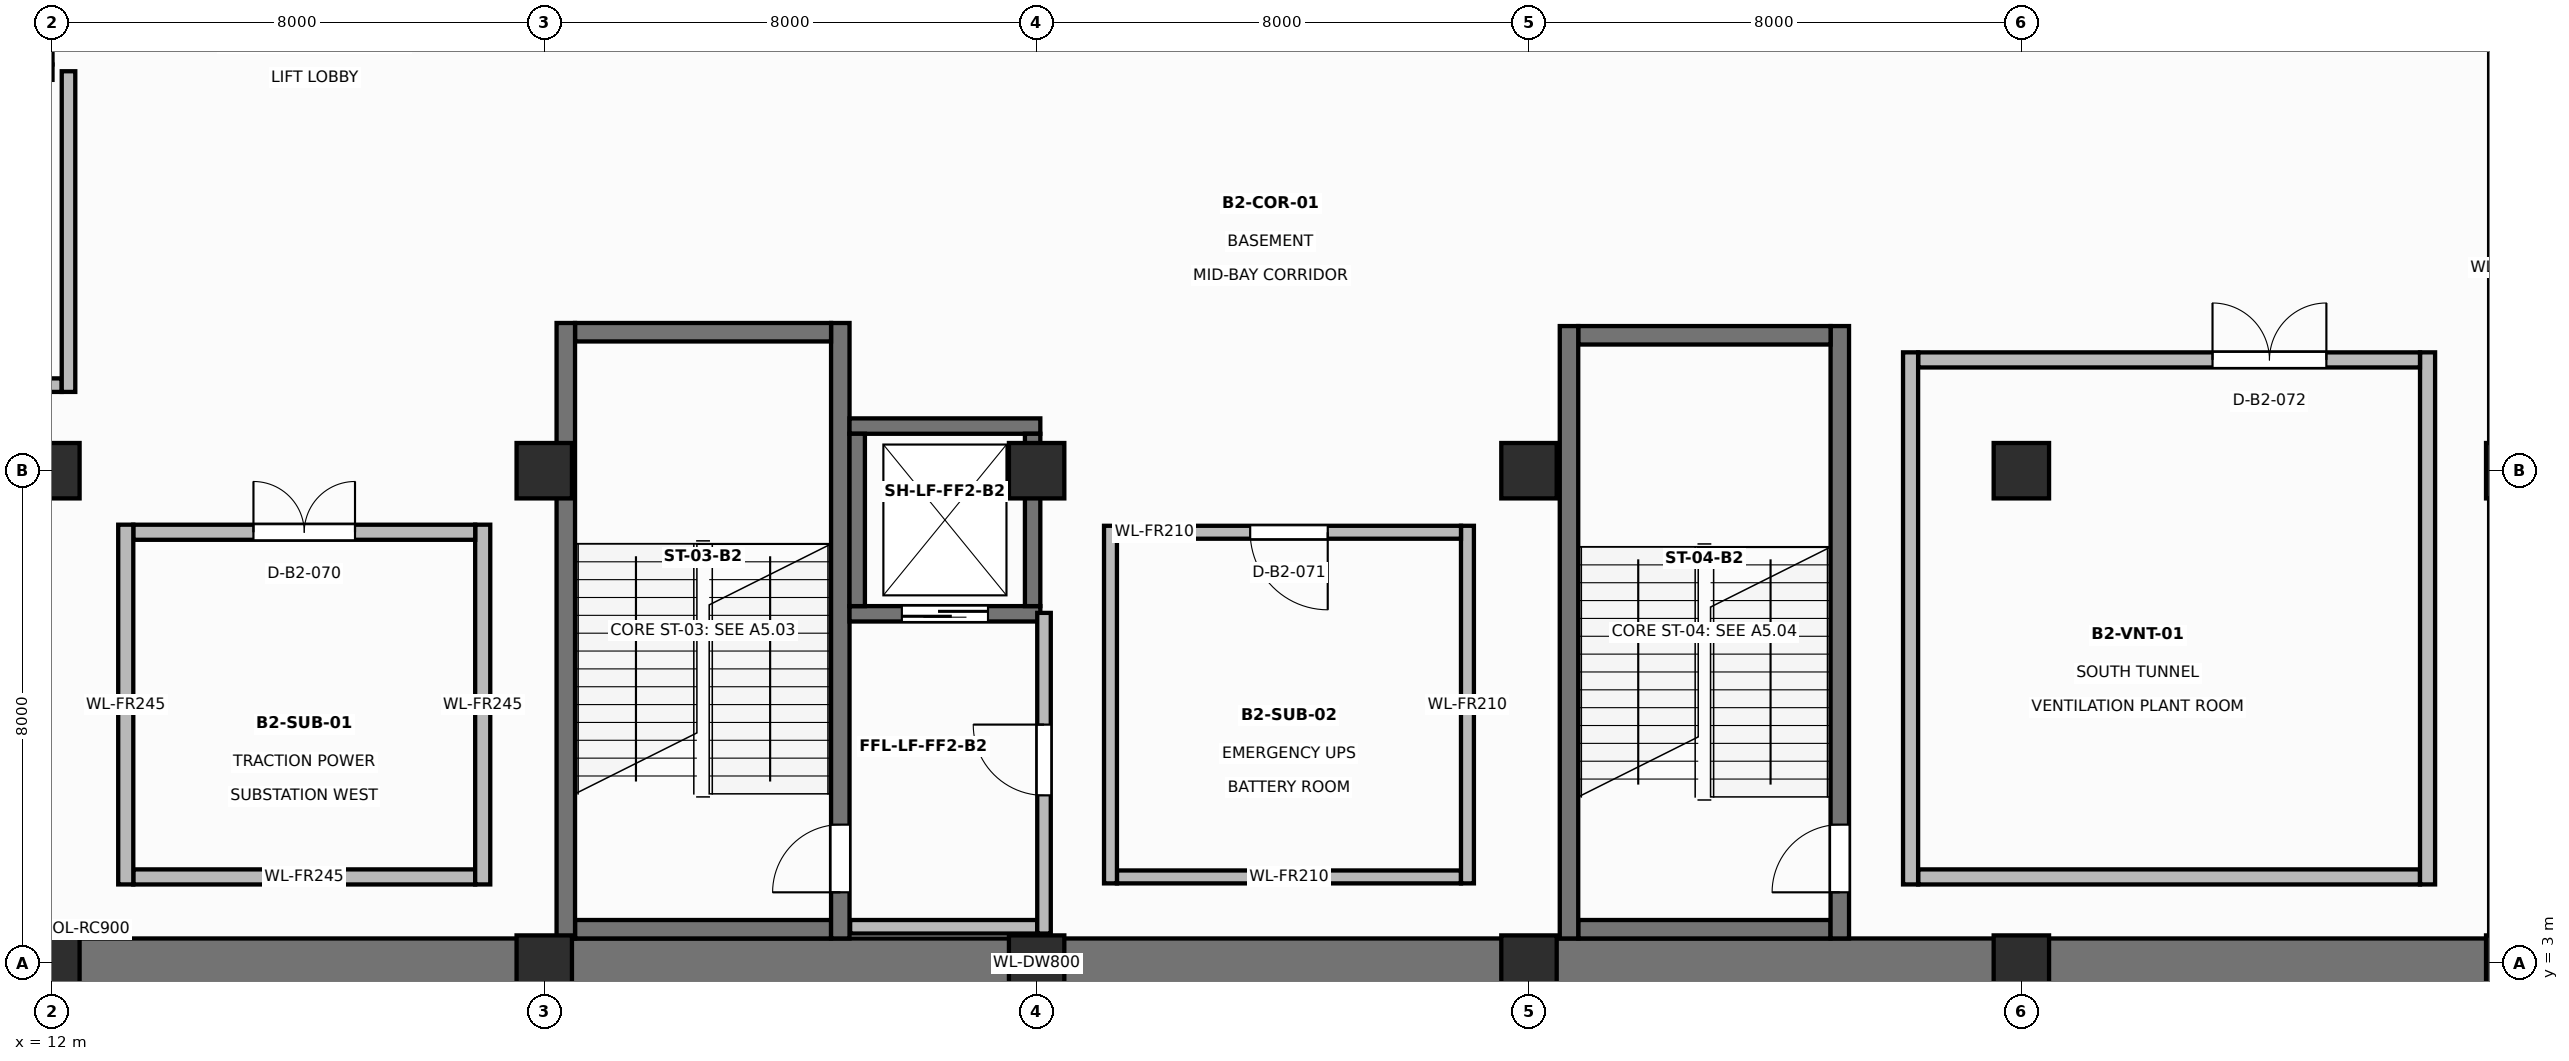
"""IFC4 building model, lengths in metres.
Left out: names, types, materials, properties, quantities, classifications, styles, units other than length and angle.
Written with IfcOpenShell. Run it as: python <this file> out.ifc"""

import sys

from ifc_helpers import new_model, si_unit, direction, frame, frame_2d, origin, origin_2d, place, context, subcontext, project, spatial, rectangle, extrude, element, fill, save


model = new_model("IFC4")
c1 = context("Model", 3, precision=1e-05, world=origin(), true_north=direction((0.0, 1.0)))
c2 = subcontext(c1, "Body", "Model", "MODEL_VIEW")
j1 = project(units=[si_unit("LENGTHUNIT", "METRE"), si_unit("PLANEANGLEUNIT", "RADIAN")], contexts=[c1])
p1 = place(None, origin())
s1 = spatial("IfcSite", under=j1, at=p1, CompositionType="ELEMENT")
p2 = place(p1, origin())
s2 = spatial("IfcBuilding", under=s1, at=p2, CompositionType="ELEMENT")
p3 = place(p2, frame((0.0, 0.0, -11.2)))
s3 = spatial("IfcBuildingStorey", under=s2, at=p3, CompositionType="ELEMENT", Elevation=-11.2)
p4 = place(p3, frame((4.4, 3.0, 0.0), z_axis=(0.0, 0.0, 1.0), x_axis=(1.0, 0.0, 0.0)))
e1 = element("IfcWall", 1, at=p4, inside=s3, PredefinedType="SOLIDWALL", context=c2, shape_type="SweptSolid", body=[
    extrude(rectangle(XDim=47.2, YDim=0.8, at=frame_2d((23.6, 0.0))), origin(), (0.0, 0.0, 1.0), 5.22),
])
p5 = place(p3, frame((52.0, 2.6, 0.0), z_axis=(0.0, 0.0, 1.0), x_axis=(0.0, 1.0, 0.0)))
e2 = element("IfcWall", 2, at=p5, inside=s3, PredefinedType="SOLIDWALL", context=c2, shape_type="SweptSolid", body=[
    extrude(rectangle(XDim=23.4, YDim=0.8, at=frame_2d((11.7, 0.0))), origin(), (0.0, 0.0, 1.0), 5.22),
])
for number, where, z_axis, x_axis in (
    (3, (12.0, 3.0, 0.0), (0.0, 0.0, 1.0), (1.0, 0.0, 0.0)),
    (4, (12.0, 11.0, 0.0), (0.0, 0.0, 1.0), (1.0, 0.0, 0.0)),
    (5, (20.0, 3.0, 0.0), (0.0, 0.0, 1.0), (1.0, 0.0, 0.0)),
    (6, (20.0, 11.0, 0.0), (0.0, 0.0, 1.0), (1.0, 0.0, 0.0)),
    (7, (28.0, 3.0, 0.0), (0.0, 0.0, 1.0), (1.0, 0.0, 0.0)),
    (8, (28.0, 11.0, 0.0), (0.0, 0.0, 1.0), (1.0, 0.0, 0.0)),
    (9, (36.0, 3.0, 0.0), (0.0, 0.0, 1.0), (1.0, 0.0, 0.0)),
    (10, (36.0, 11.0, 0.0), (0.0, 0.0, 1.0), (1.0, 0.0, 0.0)),
    (11, (44.0, 3.0, 0.0), (0.0, 0.0, 1.0), (1.0, 0.0, 0.0)),
    (12, (44.0, 11.0, 0.0), (0.0, 0.0, 1.0), (1.0, 0.0, 0.0)),
    (13, (52.0, 3.0, 0.0), (0.0, 0.0, 1.0), (1.0, 0.0, 0.0)),
    (14, (52.0, 11.0, 0.0), (0.0, 0.0, 1.0), (1.0, 0.0, 0.0)),
):
    element("IfcColumn", number, at=place(p3, frame(where, z_axis=z_axis, x_axis=x_axis)), inside=s3, PredefinedType="COLUMN", context=c2, shape_type="SweptSolid", body=[
        extrude(rectangle(XDim=0.9, YDim=0.9, at=origin_2d()), origin(), (0.0, 0.0, 1.0), 5.6),
    ])
p6 = place(p3, frame((20.5, 3.55, 0.0), z_axis=(0.0, 0.0, 1.0), x_axis=(1.0, 0.0, 0.0)))
e15 = element("IfcWall", 15, at=p6, inside=s3, PredefinedType="SHEAR", context=c2, shape_type="SweptSolid", body=[
    extrude(rectangle(XDim=4.16, YDim=0.3, at=frame_2d((2.08, 0.0))), origin(), (0.0, 0.0, 1.0), 5.235),
])
p7 = place(p3, frame((24.81, 3.4, 0.0), z_axis=(0.0, 0.0, 1.0), x_axis=(0.0, 1.0, 0.0)))
e16 = element("IfcWall", 16, at=p7, inside=s3, PredefinedType="SHEAR", context=c2, shape_type="SweptSolid", body=[
    extrude(rectangle(XDim=10.0, YDim=0.3, at=frame_2d((5.0, 0.0))), origin(), (0.0, 0.0, 1.0), 5.235),
])
p8 = place(p7, frame((0.75, 0.0, 0.0)))
e17 = element("IfcOpeningElement", 17, at=p8, cuts=e16, PredefinedType="OPENING", context=c2, shape_type="SweptSolid", body=[
    extrude(rectangle(XDim=1.1, YDim=2.15, at=frame_2d((0.55, 1.075))), frame((0.0, 0.16, 0.0), z_axis=(0.0, -1.0, 0.0), x_axis=(1.0, 0.0, 0.0)), (0.0, 0.0, 1.0), 0.32),
])
p9 = place(p3, frame((24.66, 13.25, 0.0), z_axis=(0.0, 0.0, 1.0), x_axis=(-1.0, 0.0, 0.0)))
e18 = element("IfcWall", 18, at=p9, inside=s3, PredefinedType="SHEAR", context=c2, shape_type="SweptSolid", body=[
    extrude(rectangle(XDim=4.16, YDim=0.3, at=frame_2d((2.08, 0.0))), origin(), (0.0, 0.0, 1.0), 5.235),
])
p10 = place(p3, frame((20.35, 13.4, 0.0), z_axis=(0.0, 0.0, 1.0), x_axis=(0.0, -1.0, 0.0)))
e19 = element("IfcWall", 19, at=p10, inside=s3, PredefinedType="SHEAR", context=c2, shape_type="SweptSolid", body=[
    extrude(rectangle(XDim=10.0, YDim=0.3, at=frame_2d((5.0, 0.0))), origin(), (0.0, 0.0, 1.0), 5.235),
])
p11 = place(p3, frame((36.8, 3.55, 0.0), z_axis=(0.0, 0.0, 1.0), x_axis=(1.0, 0.0, 0.0)))
e20 = element("IfcWall", 20, at=p11, inside=s3, PredefinedType="SHEAR", context=c2, shape_type="SweptSolid", body=[
    extrude(rectangle(XDim=4.1, YDim=0.3, at=frame_2d((2.05, 0.0))), origin(), (0.0, 0.0, 1.0), 5.235),
])
p12 = place(p3, frame((41.05, 3.4, 0.0), z_axis=(0.0, 0.0, 1.0), x_axis=(0.0, 1.0, 0.0)))
e21 = element("IfcWall", 21, at=p12, inside=s3, PredefinedType="SHEAR", context=c2, shape_type="SweptSolid", body=[
    extrude(rectangle(XDim=9.95, YDim=0.3, at=frame_2d((4.975, 0.0))), origin(), (0.0, 0.0, 1.0), 5.235),
])
p13 = place(p12, frame((0.75, 0.0, 0.0)))
e22 = element("IfcOpeningElement", 22, at=p13, cuts=e21, PredefinedType="OPENING", context=c2, shape_type="SweptSolid", body=[
    extrude(rectangle(XDim=1.1, YDim=2.15, at=frame_2d((0.55, 1.075))), frame((0.0, 0.16, 0.0), z_axis=(0.0, -1.0, 0.0), x_axis=(1.0, 0.0, 0.0)), (0.0, 0.0, 1.0), 0.32),
])
p14 = place(p3, frame((40.9, 13.2, 0.0), z_axis=(0.0, 0.0, 1.0), x_axis=(-1.0, 0.0, 0.0)))
e23 = element("IfcWall", 23, at=p14, inside=s3, PredefinedType="SHEAR", context=c2, shape_type="SweptSolid", body=[
    extrude(rectangle(XDim=4.1, YDim=0.3, at=frame_2d((2.05, 0.0))), origin(), (0.0, 0.0, 1.0), 5.235),
])
p15 = place(p3, frame((36.65, 13.35, 0.0), z_axis=(0.0, 0.0, 1.0), x_axis=(0.0, -1.0, 0.0)))
e24 = element("IfcWall", 24, at=p15, inside=s3, PredefinedType="SHEAR", context=c2, shape_type="SweptSolid", body=[
    extrude(rectangle(XDim=9.95, YDim=0.3, at=frame_2d((4.975, 0.0))), origin(), (0.0, 0.0, 1.0), 5.235),
])
p16 = place(p3, frame((9.11, 17.475, 0.0), z_axis=(0.0, 0.0, 1.0), x_axis=(1.0, 0.0, 0.0)))
e25 = element("IfcWall", 25, at=p16, inside=s3, PredefinedType="SOLIDWALL", context=c2, shape_type="SweptSolid", body=[
    extrude(rectangle(XDim=2.9, YDim=0.25, at=frame_2d((1.45, 0.0))), origin(), (0.0, 0.0, 1.0), 5.235),
])
p17 = place(p16, frame((0.75, 0.0, 0.0)))
e26 = element("IfcOpeningElement", 26, at=p17, cuts=e25, PredefinedType="OPENING", context=c2, shape_type="SweptSolid", body=[
    extrude(rectangle(XDim=1.4, YDim=2.25, at=frame_2d((0.7, 1.125))), frame((0.0, 0.135, 0.0), z_axis=(0.0, -1.0, 0.0), x_axis=(1.0, 0.0, 0.0)), (0.0, 0.0, 1.0), 0.27),
])
p18 = place(p3, frame((11.885, 17.6, 0.0), z_axis=(0.0, 0.0, 1.0), x_axis=(0.0, 1.0, 0.0)))
e27 = element("IfcWall", 27, at=p18, inside=s3, PredefinedType="SOLIDWALL", context=c2, shape_type="SweptSolid", body=[
    extrude(rectangle(XDim=2.8, YDim=0.25, at=frame_2d((1.4, 0.0))), origin(), (0.0, 0.0, 1.0), 5.235),
])
p19 = place(p3, frame((9.12, 12.39, 0.0), z_axis=(0.0, 0.0, 1.0), x_axis=(1.0, 0.0, 0.0)))
e28 = element("IfcWall", 28, at=p19, inside=s3, PredefinedType="SOLIDWALL", context=c2, shape_type="SweptSolid", body=[
    extrude(rectangle(XDim=3.04, YDim=0.22, at=frame_2d((1.52, 0.0))), origin(), (0.0, 0.0, 1.0), 4.435),
])
p20 = place(p19, frame((0.805, 0.0, 0.0)))
e29 = element("IfcOpeningElement", 29, at=p20, cuts=e28, PredefinedType="OPENING", context=c2, shape_type="SweptSolid", body=[
    extrude(rectangle(XDim=1.15, YDim=2.15, at=frame_2d((0.575, 1.075))), frame((0.0, 0.12, 0.0), z_axis=(0.0, -1.0, 0.0), x_axis=(1.0, 0.0, 0.0)), (0.0, 0.0, 1.0), 0.24),
])
p21 = place(p3, frame((12.27, 12.28, 0.0), z_axis=(0.0, 0.0, 1.0), x_axis=(0.0, 1.0, 0.0)))
e30 = element("IfcWall", 30, at=p21, inside=s3, PredefinedType="SOLIDWALL", context=c2, shape_type="SweptSolid", body=[
    extrude(rectangle(XDim=5.21, YDim=0.22, at=frame_2d((2.605, 0.0))), origin(), (0.0, 0.0, 1.0), 4.435),
])
p22 = place(p3, frame((24.96, 8.675, 0.0), z_axis=(0.0, 0.0, 1.0), x_axis=(1.0, 0.0, 0.0)))
e31 = element("IfcWall", 31, at=p22, inside=s3, PredefinedType="SOLIDWALL", context=c2, shape_type="SweptSolid", body=[
    extrude(rectangle(XDim=3.1, YDim=0.25, at=frame_2d((1.55, 0.0))), origin(), (0.0, 0.0, 1.0), 5.235),
])
p23 = place(p22, frame((0.85, 0.0, 0.0)))
e32 = element("IfcOpeningElement", 32, at=p23, cuts=e31, PredefinedType="OPENING", context=c2, shape_type="SweptSolid", body=[
    extrude(rectangle(XDim=1.4, YDim=2.25, at=frame_2d((0.7, 1.125))), frame((0.0, 0.135, 0.0), z_axis=(0.0, -1.0, 0.0), x_axis=(1.0, 0.0, 0.0)), (0.0, 0.0, 1.0), 0.27),
])
p24 = place(p3, frame((28.06, 11.725, 0.0), z_axis=(0.0, 0.0, 1.0), x_axis=(-1.0, 0.0, 0.0)))
e33 = element("IfcWall", 33, at=p24, inside=s3, PredefinedType="SOLIDWALL", context=c2, shape_type="SweptSolid", body=[
    extrude(rectangle(XDim=3.1, YDim=0.25, at=frame_2d((1.55, 0.0))), origin(), (0.0, 0.0, 1.0), 5.235),
])
for number, where, z_axis, x_axis in (
    (34, (27.935, 8.8, 0.0), (0.0, 0.0, 1.0), (0.0, 1.0, 0.0)),
    (35, (25.085, 11.6, 0.0), (0.0, 0.0, 1.0), (0.0, -1.0, 0.0)),
):
    element("IfcWall", number, at=place(p3, frame(where, z_axis=z_axis, x_axis=x_axis)), inside=s3, PredefinedType="SOLIDWALL", context=c2, shape_type="SweptSolid", body=[
        extrude(rectangle(XDim=2.8, YDim=0.25, at=frame_2d((1.4, 0.0))), origin(), (0.0, 0.0, 1.0), 5.235),
    ])
p25 = place(p3, frame((24.97, 3.59, 0.0), z_axis=(0.0, 0.0, 1.0), x_axis=(1.0, 0.0, 0.0)))
e36 = element("IfcWall", 36, at=p25, inside=s3, PredefinedType="SOLIDWALL", context=c2, shape_type="SweptSolid", body=[
    extrude(rectangle(XDim=3.04, YDim=0.22, at=frame_2d((1.52, 0.0))), origin(), (0.0, 0.0, 1.0), 4.435),
])
p26 = place(p3, frame((28.12, 3.48, 0.0), z_axis=(0.0, 0.0, 1.0), x_axis=(0.0, 1.0, 0.0)))
e37 = element("IfcWall", 37, at=p26, inside=s3, PredefinedType="SOLIDWALL", context=c2, shape_type="SweptSolid", body=[
    extrude(rectangle(XDim=5.21, YDim=0.22, at=frame_2d((2.605, 0.0))), origin(), (0.0, 0.0, 1.0), 4.435),
])
p27 = place(p26, frame((2.245, 0.0, 0.0)))
e38 = element("IfcOpeningElement", 38, at=p27, cuts=e37, PredefinedType="OPENING", context=c2, shape_type="SweptSolid", body=[
    extrude(rectangle(XDim=1.15, YDim=2.15, at=frame_2d((0.575, 1.075))), frame((0.0, 0.12, 0.0), z_axis=(0.0, -1.0, 0.0), x_axis=(1.0, 0.0, 0.0)), (0.0, 0.0, 1.0), 0.24),
])
p28 = place(p3, frame((13.322, 4.4, 0.0), z_axis=(0.0, 0.0, 1.0), x_axis=(1.0, 0.0, 0.0)))
e39 = element("IfcWall", 39, at=p28, inside=s3, PredefinedType="SOLIDWALL", context=c2, shape_type="SweptSolid", body=[
    extrude(rectangle(XDim=5.556, YDim=0.245, at=frame_2d((2.778, 0.0))), origin(), (0.0, 0.0, 1.0), 5.22),
])
p29 = place(p3, frame((19.0, 4.278, 0.0), z_axis=(0.0, 0.0, 1.0), x_axis=(0.0, 1.0, 0.0)))
e40 = element("IfcWall", 40, at=p29, inside=s3, PredefinedType="SOLIDWALL", context=c2, shape_type="SweptSolid", body=[
    extrude(rectangle(XDim=5.845, YDim=0.245, at=frame_2d((2.922, 0.0))), origin(), (0.0, 0.0, 1.0), 4.585),
])
p30 = place(p3, frame((18.878, 10.0, 0.0), z_axis=(0.0, 0.0, 1.0), x_axis=(-1.0, 0.0, 0.0)))
e41 = element("IfcWall", 41, at=p30, inside=s3, PredefinedType="SOLIDWALL", context=c2, shape_type="SweptSolid", body=[
    extrude(rectangle(XDim=5.556, YDim=0.245, at=frame_2d((2.778, 0.0))), origin(), (0.0, 0.0, 1.0), 5.22),
])
p31 = place(p30, frame((1.953, 0.0, 0.0)))
e42 = element("IfcOpeningElement", 42, at=p31, cuts=e41, PredefinedType="OPENING", context=c2, shape_type="SweptSolid", body=[
    extrude(rectangle(XDim=1.65, YDim=2.2, at=frame_2d((0.825, 1.1))), frame((0.0, 0.133, 0.0), z_axis=(0.0, -1.0, 0.0), x_axis=(1.0, 0.0, 0.0)), (0.0, 0.0, 1.0), 0.265),
])
p32 = place(p3, frame((13.2, 10.123, 0.0), z_axis=(0.0, 0.0, 1.0), x_axis=(0.0, -1.0, 0.0)))
e43 = element("IfcWall", 43, at=p32, inside=s3, PredefinedType="SOLIDWALL", context=c2, shape_type="SweptSolid", body=[
    extrude(rectangle(XDim=5.845, YDim=0.245, at=frame_2d((2.922, 0.0))), origin(), (0.0, 0.0, 1.0), 4.585),
])
p33 = place(p3, frame((29.305, 4.4, 0.0), z_axis=(0.0, 0.0, 1.0), x_axis=(1.0, 0.0, 0.0)))
e44 = element("IfcWall", 44, at=p33, inside=s3, PredefinedType="SOLIDWALL", context=c2, shape_type="SweptSolid", body=[
    extrude(rectangle(XDim=5.59, YDim=0.21, at=frame_2d((2.795, 0.0))), origin(), (0.0, 0.0, 1.0), 5.22),
])
p34 = place(p3, frame((35.0, 4.295, 0.0), z_axis=(0.0, 0.0, 1.0), x_axis=(0.0, 1.0, 0.0)))
e45 = element("IfcWall", 45, at=p34, inside=s3, PredefinedType="SOLIDWALL", context=c2, shape_type="SweptSolid", body=[
    extrude(rectangle(XDim=5.81, YDim=0.21, at=frame_2d((2.905, 0.0))), origin(), (0.0, 0.0, 1.0), 4.585),
])
p35 = place(p3, frame((34.895, 10.0, 0.0), z_axis=(0.0, 0.0, 1.0), x_axis=(-1.0, 0.0, 0.0)))
e46 = element("IfcWall", 46, at=p35, inside=s3, PredefinedType="SOLIDWALL", context=c2, shape_type="SweptSolid", body=[
    extrude(rectangle(XDim=5.59, YDim=0.21, at=frame_2d((2.795, 0.0))), origin(), (0.0, 0.0, 1.0), 5.22),
])
p36 = place(p35, frame((2.165, 0.0, 0.0)))
e47 = element("IfcOpeningElement", 47, at=p36, cuts=e46, PredefinedType="OPENING", context=c2, shape_type="SweptSolid", body=[
    extrude(rectangle(XDim=1.26, YDim=2.2, at=frame_2d((0.63, 1.1))), frame((0.0, 0.115, 0.0), z_axis=(0.0, -1.0, 0.0), x_axis=(1.0, 0.0, 0.0)), (0.0, 0.0, 1.0), 0.23),
])
p37 = place(p3, frame((29.2, 10.105, 0.0), z_axis=(0.0, 0.0, 1.0), x_axis=(0.0, -1.0, 0.0)))
e48 = element("IfcWall", 48, at=p37, inside=s3, PredefinedType="SOLIDWALL", context=c2, shape_type="SweptSolid", body=[
    extrude(rectangle(XDim=5.81, YDim=0.21, at=frame_2d((2.905, 0.0))), origin(), (0.0, 0.0, 1.0), 4.585),
])
p38 = place(p3, frame((42.323, 4.4, 0.0), z_axis=(0.0, 0.0, 1.0), x_axis=(1.0, 0.0, 0.0)))
e49 = element("IfcWall", 49, at=p38, inside=s3, PredefinedType="SOLIDWALL", context=c2, shape_type="SweptSolid", body=[
    extrude(rectangle(XDim=8.154, YDim=0.245, at=frame_2d((4.077, 0.0))), origin(), (0.0, 0.0, 1.0), 4.435),
])
p39 = place(p3, frame((50.6, 4.278, 0.0), z_axis=(0.0, 0.0, 1.0), x_axis=(0.0, 1.0, 0.0)))
e50 = element("IfcWall", 50, at=p39, inside=s3, PredefinedType="SOLIDWALL", context=c2, shape_type="SweptSolid", body=[
    extrude(rectangle(XDim=8.645, YDim=0.245, at=frame_2d((4.323, 0.0))), origin(), (0.0, 0.0, 1.0), 4.435),
])
p40 = place(p3, frame((50.477, 12.8, 0.0), z_axis=(0.0, 0.0, 1.0), x_axis=(-1.0, 0.0, 0.0)))
e51 = element("IfcWall", 51, at=p40, inside=s3, PredefinedType="SOLIDWALL", context=c2, shape_type="SweptSolid", body=[
    extrude(rectangle(XDim=8.154, YDim=0.245, at=frame_2d((4.077, 0.0))), origin(), (0.0, 0.0, 1.0), 4.435),
])
p41 = place(p40, frame((1.521, 0.0, 0.0)))
e52 = element("IfcOpeningElement", 52, at=p41, cuts=e51, PredefinedType="OPENING", context=c2, shape_type="SweptSolid", body=[
    extrude(rectangle(XDim=1.85, YDim=2.24, at=frame_2d((0.925, 1.12))), frame((0.0, 0.133, 0.0), z_axis=(0.0, -1.0, 0.0), x_axis=(1.0, 0.0, 0.0)), (0.0, 0.0, 1.0), 0.265),
])
p42 = place(p3, frame((42.2, 12.923, 0.0), z_axis=(0.0, 0.0, 1.0), x_axis=(0.0, -1.0, 0.0)))
e53 = element("IfcWall", 53, at=p42, inside=s3, PredefinedType="SOLIDWALL", context=c2, shape_type="SweptSolid", body=[
    extrude(rectangle(XDim=8.645, YDim=0.245, at=frame_2d((4.323, 0.0))), origin(), (0.0, 0.0, 1.0), 5.22),
])
p43 = place(p8, origin())
e54 = element("IfcDoor", 54, at=p43, inside=s3, OperationType="SINGLE_SWING_LEFT", PredefinedType="DOOR", context=c2, shape_type="SweptSolid", body=[
    extrude(rectangle(XDim=1.1, YDim=2.15, at=frame_2d((0.55, 1.075))), frame((0.0, 0.025, 0.0), z_axis=(0.0, -1.0, 0.0), x_axis=(1.0, 0.0, 0.0)), (0.0, 0.0, 1.0), 0.05),
])
fill(e17, e54)
p44 = place(p13, origin())
e55 = element("IfcDoor", 55, at=p44, inside=s3, OperationType="SINGLE_SWING_LEFT", PredefinedType="DOOR", context=c2, shape_type="SweptSolid", body=[
    extrude(rectangle(XDim=1.1, YDim=2.15, at=frame_2d((0.55, 1.075))), frame((0.0, 0.025, 0.0), z_axis=(0.0, -1.0, 0.0), x_axis=(1.0, 0.0, 0.0)), (0.0, 0.0, 1.0), 0.05),
])
fill(e22, e55)
p45 = place(p23, frame((1.4, 0.0, 0.0), z_axis=(0.0, 0.0, 1.0), x_axis=(-1.0, 0.0, 0.0)))
e56 = element("IfcDoor", 56, at=p45, inside=s3, OperationType="DOUBLE_DOOR_SLIDING", PredefinedType="DOOR", context=c2, shape_type="SweptSolid", body=[
    extrude(rectangle(XDim=1.4, YDim=2.25, at=frame_2d((0.7, 1.125))), frame((0.0, 0.025, 0.0), z_axis=(0.0, -1.0, 0.0), x_axis=(1.0, 0.0, 0.0)), (0.0, 0.0, 1.0), 0.05),
])
fill(e32, e56)
p46 = place(p27, origin())
e57 = element("IfcDoor", 57, at=p46, inside=s3, OperationType="SINGLE_SWING_RIGHT", PredefinedType="DOOR", context=c2, shape_type="SweptSolid", body=[
    extrude(rectangle(XDim=1.15, YDim=2.15, at=frame_2d((0.575, 1.075))), frame((0.0, 0.025, 0.0), z_axis=(0.0, -1.0, 0.0), x_axis=(1.0, 0.0, 0.0)), (0.0, 0.0, 1.0), 0.05),
])
fill(e38, e57)
p47 = place(p31, frame((1.65, 0.0, 0.0), z_axis=(0.0, 0.0, 1.0), x_axis=(-1.0, 0.0, 0.0)))
e58 = element("IfcDoor", 58, at=p47, inside=s3, OperationType="DOUBLE_DOOR_SINGLE_SWING", PredefinedType="DOOR", context=c2, shape_type="SweptSolid", body=[
    extrude(rectangle(XDim=1.65, YDim=2.2, at=frame_2d((0.825, 1.1))), frame((0.0, 0.025, 0.0), z_axis=(0.0, -1.0, 0.0), x_axis=(1.0, 0.0, 0.0)), (0.0, 0.0, 1.0), 0.05),
])
fill(e42, e58)
p48 = place(p36, origin())
e59 = element("IfcDoor", 59, at=p48, inside=s3, OperationType="SINGLE_SWING_LEFT", PredefinedType="DOOR", context=c2, shape_type="SweptSolid", body=[
    extrude(rectangle(XDim=1.26, YDim=2.2, at=frame_2d((0.63, 1.1))), frame((0.0, 0.025, 0.0), z_axis=(0.0, -1.0, 0.0), x_axis=(1.0, 0.0, 0.0)), (0.0, 0.0, 1.0), 0.05),
])
fill(e47, e59)
p49 = place(p41, frame((1.85, 0.0, 0.0), z_axis=(0.0, 0.0, 1.0), x_axis=(-1.0, 0.0, 0.0)))
e60 = element("IfcDoor", 60, at=p49, inside=s3, OperationType="DOUBLE_DOOR_SINGLE_SWING", PredefinedType="DOOR", context=c2, shape_type="SweptSolid", body=[
    extrude(rectangle(XDim=1.85, YDim=2.24, at=frame_2d((0.925, 1.12))), frame((0.0, 0.025, 0.0), z_axis=(0.0, -1.0, 0.0), x_axis=(1.0, 0.0, 0.0)), (0.0, 0.0, 1.0), 0.05),
])
fill(e52, e60)
save(model, sys.argv[1])
